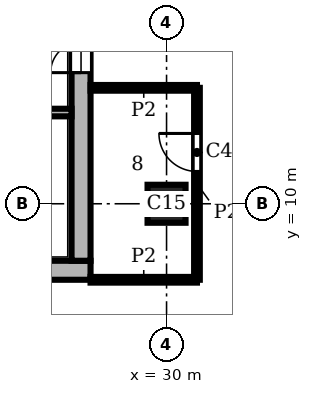
"""IFC4 building model, lengths in metres.
Left out: names, types, materials, properties, quantities, classifications, styles, units other than length and angle.
Written with IfcOpenShell. Run it as: python <this file> out.ifc"""

import sys

from ifc_helpers import new_model, si_unit, direction, frame, frame_2d, origin, origin_2d, place, context, subcontext, project, spatial, rectangle, extrude, element, fill, save


model = new_model("IFC4")
c1 = context("Model", 3, precision=1e-05, world=origin(), true_north=direction((0.0, 1.0)))
c2 = subcontext(c1, "Body", "Model", "MODEL_VIEW")
j1 = project(units=[si_unit("LENGTHUNIT", "METRE"), si_unit("PLANEANGLEUNIT", "RADIAN")], contexts=[c1])
p1 = place(None, origin())
s1 = spatial("IfcSite", under=j1, at=p1, CompositionType="ELEMENT")
p2 = place(p1, origin())
s2 = spatial("IfcBuilding", under=s1, at=p2, CompositionType="ELEMENT")
p3 = place(p2, frame((0.0, 0.0, 282.6)))
s3 = spatial("IfcBuildingStorey", under=s2, at=p3, CompositionType="ELEMENT", Elevation=282.6)
p4 = place(p3, frame((30.0, 10.0, 0.0), z_axis=(0.0, 0.0, 1.0), x_axis=(1.0, 0.0, 0.0)))
e1 = element("IfcColumn", 1, at=p4, inside=s3, PredefinedType="COLUMN", context=c2, shape_type="SweptSolid", body=[
    extrude(rectangle(XDim=1.0, YDim=1.0, at=origin_2d()), origin(), (0.0, 0.0, 1.0), 3.9),
])
p5 = place(p3, frame((8.0, 8.25, 0.0), z_axis=(0.0, 0.0, 1.0), x_axis=(1.0, 0.0, 0.0)))
e2 = element("IfcWall", 2, at=p5, inside=s3, PredefinedType="SHEAR", context=c2, shape_type="SweptSolid", body=[
    extrude(rectangle(XDim=20.0, YDim=0.5, at=frame_2d((10.0, 0.0))), origin(), (0.0, 0.0, 1.0), 3.9),
])
p6 = place(p3, frame((27.75, 8.5, 0.0), z_axis=(0.0, 0.0, 1.0), x_axis=(0.0, 1.0, 0.0)))
e3 = element("IfcWall", 3, at=p6, inside=s3, PredefinedType="SHEAR", context=c2, shape_type="SweptSolid", body=[
    extrude(rectangle(XDim=19.0, YDim=0.5, at=frame_2d((9.5, 0.0))), origin(), (0.0, 0.0, 1.0), 3.9),
])
p7 = place(p6, frame((4.95, 0.0, 0.0)))
e4 = element("IfcOpeningElement", 4, at=p7, cuts=e3, PredefinedType="OPENING", context=c2, shape_type="SweptSolid", body=[
    extrude(rectangle(XDim=1.6, YDim=2.1, at=frame_2d((0.8, 1.05))), frame((0.0, 0.26, 0.0), z_axis=(0.0, -1.0, 0.0), x_axis=(1.0, 0.0, 0.0)), (0.0, 0.0, 1.0), 0.52),
])
p8 = place(p3, frame((13.8, 12.4, 0.0), z_axis=(0.0, 0.0, 1.0), x_axis=(1.0, 0.0, 0.0)))
e5 = element("IfcWall", 5, at=p8, inside=s3, PredefinedType="SHEAR", context=c2, shape_type="SweptSolid", body=[
    extrude(rectangle(XDim=13.7, YDim=0.2, at=frame_2d((6.85, 0.0))), origin(), (0.0, 0.0, 1.0), 3.58),
])
p9 = place(p8, frame((2.4, 0.0, 0.0)))
e6 = element("IfcOpeningElement", 6, at=p9, cuts=e5, PredefinedType="OPENING", context=c2, shape_type="SweptSolid", body=[
    extrude(rectangle(XDim=1.1, YDim=2.1, at=frame_2d((0.55, 1.05))), frame((0.0, 0.11, 0.0), z_axis=(0.0, -1.0, 0.0), x_axis=(1.0, 0.0, 0.0)), (0.0, 0.0, 1.0), 0.22),
])
p10 = place(p8, frame((4.9, 0.0, 0.0)))
e7 = element("IfcOpeningElement", 7, at=p10, cuts=e5, PredefinedType="OPENING", context=c2, shape_type="SweptSolid", body=[
    extrude(rectangle(XDim=1.1, YDim=2.1, at=frame_2d((0.55, 1.05))), frame((0.0, 0.11, 0.0), z_axis=(0.0, -1.0, 0.0), x_axis=(1.0, 0.0, 0.0)), (0.0, 0.0, 1.0), 0.22),
])
p11 = place(p8, frame((0.15, 0.0, 0.0)))
e8 = element("IfcOpeningElement", 8, at=p11, cuts=e5, PredefinedType="OPENING", context=c2, shape_type="SweptSolid", body=[
    extrude(rectangle(XDim=1.0, YDim=2.1, at=frame_2d((0.5, 1.05))), frame((0.0, 0.11, 0.0), z_axis=(0.0, -1.0, 0.0), x_axis=(1.0, 0.0, 0.0)), (0.0, 0.0, 1.0), 0.22),
])
p12 = place(p3, frame((30.8, 8.0, 0.0), z_axis=(0.0, 0.0, 1.0), x_axis=(0.0, 1.0, 0.0)))
e9 = element("IfcWall", 9, at=p12, inside=s3, PredefinedType="PARTITIONING", context=c2, shape_type="SweptSolid", body=[
    extrude(rectangle(XDim=5.05, YDim=0.15, at=frame_2d((2.525, 0.0))), origin(), (0.0, 0.0, 1.0), 3.58),
])
p13 = place(p12, frame((2.85, 0.0, 0.0)))
e10 = element("IfcOpeningElement", 10, at=p13, cuts=e9, PredefinedType="OPENING", context=c2, shape_type="SweptSolid", body=[
    extrude(rectangle(XDim=1.0, YDim=2.1, at=frame_2d((0.5, 1.05))), frame((0.0, 0.085, 0.0), z_axis=(0.0, -1.0, 0.0), x_axis=(1.0, 0.0, 0.0)), (0.0, 0.0, 1.0), 0.17),
])
for number, where, z_axis, x_axis in (
    (11, (28.0, 8.0, 0.0), (0.0, 0.0, 1.0), (1.0, 0.0, 0.0)),
    (12, (28.0, 13.05, 0.0), (0.0, 0.0, 1.0), (1.0, 0.0, 0.0)),
):
    element("IfcWall", number, at=place(p3, frame(where, z_axis=z_axis, x_axis=x_axis)), inside=s3, PredefinedType="PARTITIONING", context=c2, shape_type="SweptSolid", body=[
        extrude(rectangle(XDim=2.8, YDim=0.15, at=frame_2d((1.4, 0.0))), origin(), (0.0, 0.0, 1.0), 3.58),
    ])
p14 = place(p7, origin())
e13 = element("IfcDoor", 13, at=p14, inside=s3, OperationType="DOUBLE_DOOR_SINGLE_SWING", PredefinedType="DOOR", context=c2, shape_type="SweptSolid", body=[
    extrude(rectangle(XDim=1.6, YDim=2.1, at=frame_2d((0.8, 1.05))), frame((0.0, 0.025, 0.0), z_axis=(0.0, -1.0, 0.0), x_axis=(1.0, 0.0, 0.0)), (0.0, 0.0, 1.0), 0.05),
])
fill(e4, e13)
p15 = place(p13, origin())
e14 = element("IfcDoor", 14, at=p15, inside=s3, OperationType="SINGLE_SWING_RIGHT", PredefinedType="DOOR", context=c2, shape_type="SweptSolid", body=[
    extrude(rectangle(XDim=1.0, YDim=2.1, at=frame_2d((0.5, 1.05))), frame((0.0, 0.025, 0.0), z_axis=(0.0, -1.0, 0.0), x_axis=(1.0, 0.0, 0.0)), (0.0, 0.0, 1.0), 0.05),
])
fill(e10, e14)
save(model, sys.argv[1])
